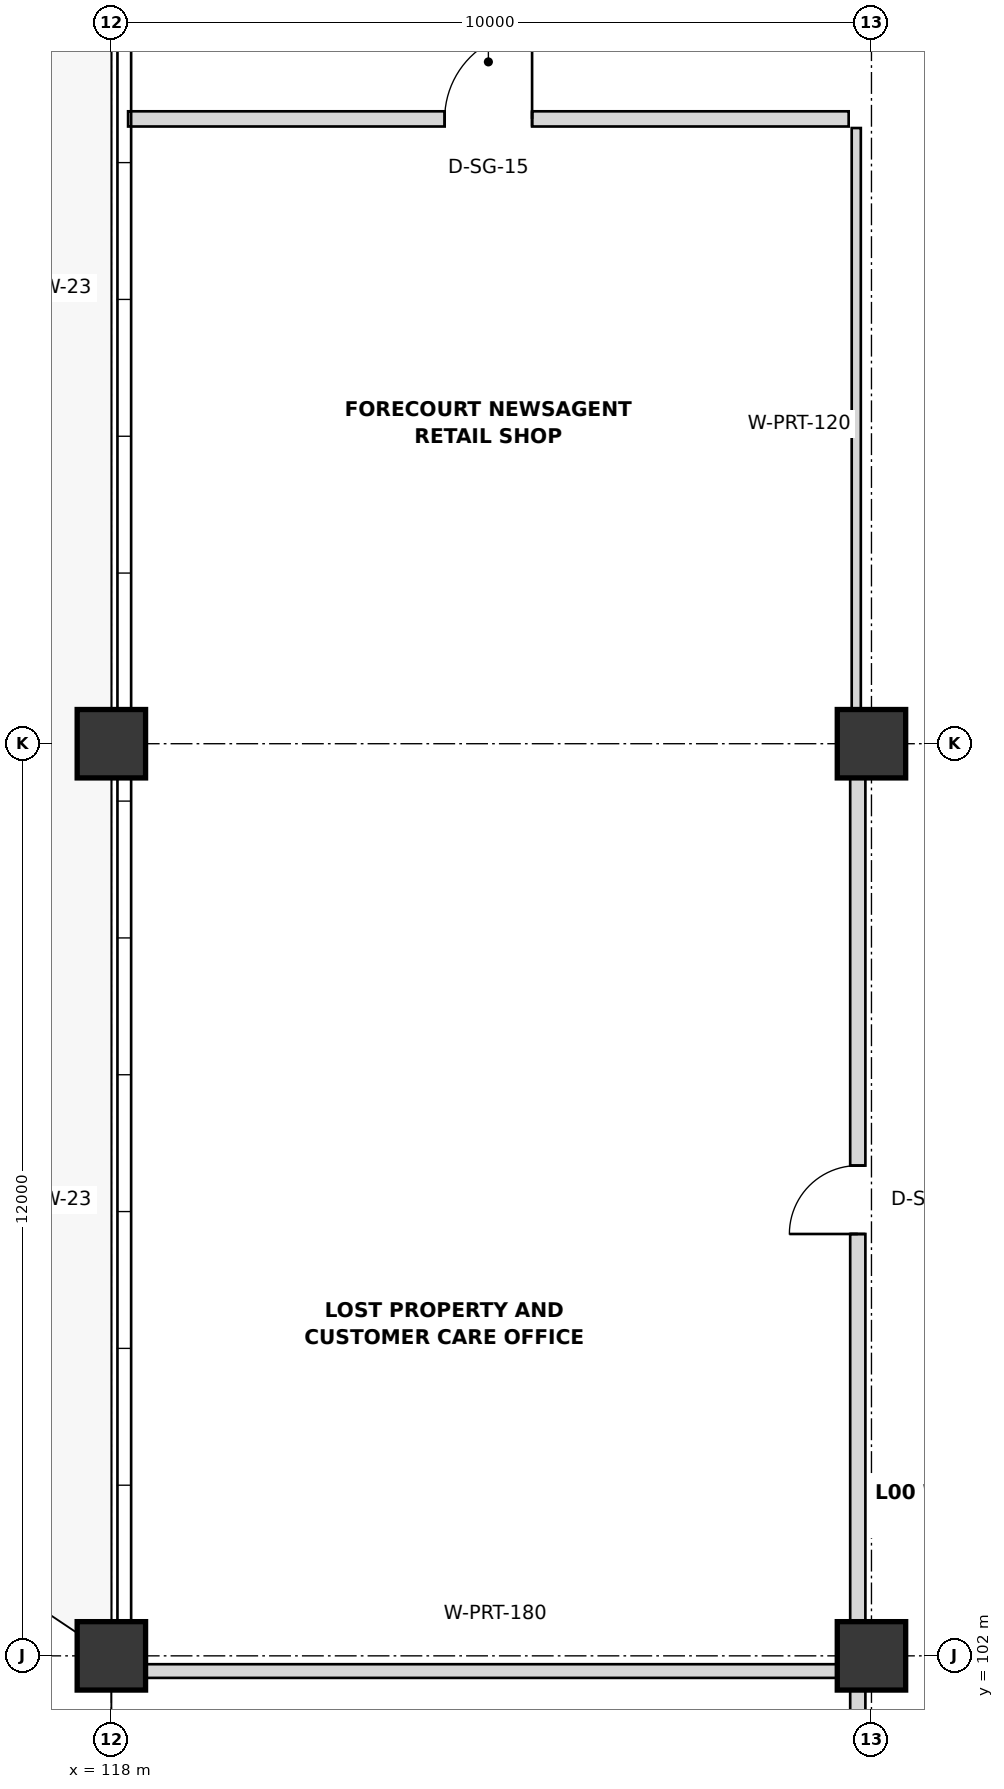
"""IFC4 building model, lengths in metres.
Left out: names, types, materials, properties, quantities, classifications, styles, units other than length and angle.
Written with IfcOpenShell. Run it as: python <this file> out.ifc"""

import sys

from ifc_helpers import new_model, si_unit, direction, frame, frame_2d, origin, origin_2d, place, context, subcontext, project, spatial, rectangle, extrude, element, fill, save


model = new_model("IFC4")
c1 = context("Model", 3, precision=1e-05, world=origin(), true_north=direction((0.0, 1.0)))
c2 = subcontext(c1, "Body", "Model", "MODEL_VIEW")
j1 = project(units=[si_unit("LENGTHUNIT", "METRE"), si_unit("PLANEANGLEUNIT", "RADIAN")], contexts=[c1])
p1 = place(None, origin())
s1 = spatial("IfcSite", under=j1, at=p1, CompositionType="ELEMENT")
p2 = place(p1, origin())
s2 = spatial("IfcBuilding", under=s1, at=p2, CompositionType="ELEMENT")
p3 = place(p2, origin())
s3 = spatial("IfcBuildingStorey", under=s2, at=p3, CompositionType="ELEMENT", Elevation=0.0)
for number, where, z_axis, x_axis in (
    (1, (118.0, 102.0, 0.0), (0.0, 0.0, 1.0), (1.0, 0.0, 0.0)),
    (2, (118.0, 114.0, 0.0), (0.0, 0.0, 1.0), (1.0, 0.0, 0.0)),
    (3, (128.0, 102.0, 0.0), (0.0, 0.0, 1.0), (1.0, 0.0, 0.0)),
    (4, (128.0, 114.0, 0.0), (0.0, 0.0, 1.0), (1.0, 0.0, 0.0)),
):
    element("IfcColumn", number, at=place(p3, frame(where, z_axis=z_axis, x_axis=x_axis)), inside=s3, PredefinedType="COLUMN", context=c2, shape_type="SweptSolid", body=[
        extrude(rectangle(XDim=0.9, YDim=0.9, at=origin_2d()), origin(), (0.0, 0.0, 1.0), 5.4),
    ])
p4 = place(p3, frame((118.22, 122.22, 0.0), z_axis=(0.0, 0.0, 1.0), x_axis=(1.0, 0.0, 0.0)))
e5 = element("IfcWall", 5, at=p4, inside=s3, PredefinedType="PARTITIONING", context=c2, shape_type="SweptSolid", body=[
    extrude(rectangle(XDim=9.48, YDim=0.2, at=frame_2d((4.74, 0.0))), origin(), (0.0, 0.0, 1.0), 4.358),
])
p5 = place(p4, frame((4.165, 0.0, 0.0)))
e6 = element("IfcOpeningElement", 6, at=p5, cuts=e5, PredefinedType="OPENING", context=c2, shape_type="SweptSolid", body=[
    extrude(rectangle(XDim=1.15, YDim=2.3, at=frame_2d((0.575, 1.15))), frame((0.0, 0.11, 0.0), z_axis=(0.0, -1.0, 0.0), x_axis=(1.0, 0.0, 0.0)), (0.0, 0.0, 1.0), 0.22),
])
p6 = place(p3, frame((127.8, 114.3, 0.0), z_axis=(0.0, 0.0, 1.0), x_axis=(0.0, 1.0, 0.0)))
e7 = element("IfcWall", 7, at=p6, inside=s3, PredefinedType="PARTITIONING", context=c2, shape_type="SweptSolid", body=[
    extrude(rectangle(XDim=7.8, YDim=0.12, at=frame_2d((3.9, 0.0))), origin(), (0.0, 0.0, 1.0), 4.258),
])
p7 = place(p3, frame((127.82, 78.3, 0.0), z_axis=(0.0, 0.0, 1.0), x_axis=(0.0, 1.0, 0.0)))
e8 = element("IfcWall", 8, at=p7, inside=s3, PredefinedType="PARTITIONING", context=c2, shape_type="SweptSolid", body=[
    extrude(rectangle(XDim=23.4, YDim=0.2, at=frame_2d((11.7, 0.0))), origin(), (0.0, 0.0, 1.0), 4.258),
])
p8 = place(p7, frame((4.75, 0.0, 0.0)))
e9 = element("IfcOpeningElement", 9, at=p8, cuts=e8, PredefinedType="OPENING", context=c2, shape_type="SweptSolid", body=[
    extrude(rectangle(XDim=1.9, YDim=2.25, at=frame_2d((0.95, 1.125))), frame((0.0, 0.11, 0.0), z_axis=(0.0, -1.0, 0.0), x_axis=(1.0, 0.0, 0.0)), (0.0, 0.0, 1.0), 0.22),
])
p9 = place(p3, frame((118.4, 101.8, 0.0), z_axis=(0.0, 0.0, 1.0), x_axis=(1.0, 0.0, 0.0)))
e10 = element("IfcWall", 10, at=p9, inside=s3, PredefinedType="PARTITIONING", context=c2, shape_type="SweptSolid", body=[
    extrude(rectangle(XDim=9.3, YDim=0.18, at=frame_2d((4.65, 0.0))), origin(), (0.0, 0.0, 1.0), 4.258),
])
p10 = place(p3, frame((127.82, 102.3, 0.0), z_axis=(0.0, 0.0, 1.0), x_axis=(0.0, 1.0, 0.0)))
e11 = element("IfcWall", 11, at=p10, inside=s3, PredefinedType="PARTITIONING", context=c2, shape_type="SweptSolid", body=[
    extrude(rectangle(XDim=11.4, YDim=0.2, at=frame_2d((5.7, 0.0))), origin(), (0.0, 0.0, 1.0), 4.258),
])
p11 = place(p10, frame((5.25, 0.0, 0.0)))
e12 = element("IfcOpeningElement", 12, at=p11, cuts=e11, PredefinedType="OPENING", context=c2, shape_type="SweptSolid", body=[
    extrude(rectangle(XDim=0.9, YDim=2.2, at=frame_2d((0.45, 1.1))), frame((0.0, 0.11, 0.0), z_axis=(0.0, -1.0, 0.0), x_axis=(1.0, 0.0, 0.0)), (0.0, 0.0, 1.0), 0.22),
])
p12 = place(p5, origin())
e13 = element("IfcDoor", 13, at=p12, inside=s3, OperationType="SINGLE_SWING_RIGHT", PredefinedType="DOOR", context=c2, shape_type="SweptSolid", body=[
    extrude(rectangle(XDim=1.15, YDim=2.3, at=frame_2d((0.575, 1.15))), frame((0.0, 0.025, 0.0), z_axis=(0.0, -1.0, 0.0), x_axis=(1.0, 0.0, 0.0)), (0.0, 0.0, 1.0), 0.05),
])
fill(e6, e13)
p13 = place(p11, origin())
e14 = element("IfcDoor", 14, at=p13, inside=s3, OperationType="SINGLE_SWING_LEFT", PredefinedType="DOOR", context=c2, shape_type="SweptSolid", body=[
    extrude(rectangle(XDim=0.9, YDim=2.2, at=frame_2d((0.45, 1.1))), frame((0.0, 0.025, 0.0), z_axis=(0.0, -1.0, 0.0), x_axis=(1.0, 0.0, 0.0)), (0.0, 0.0, 1.0), 0.05),
])
fill(e12, e14)
save(model, sys.argv[1])
